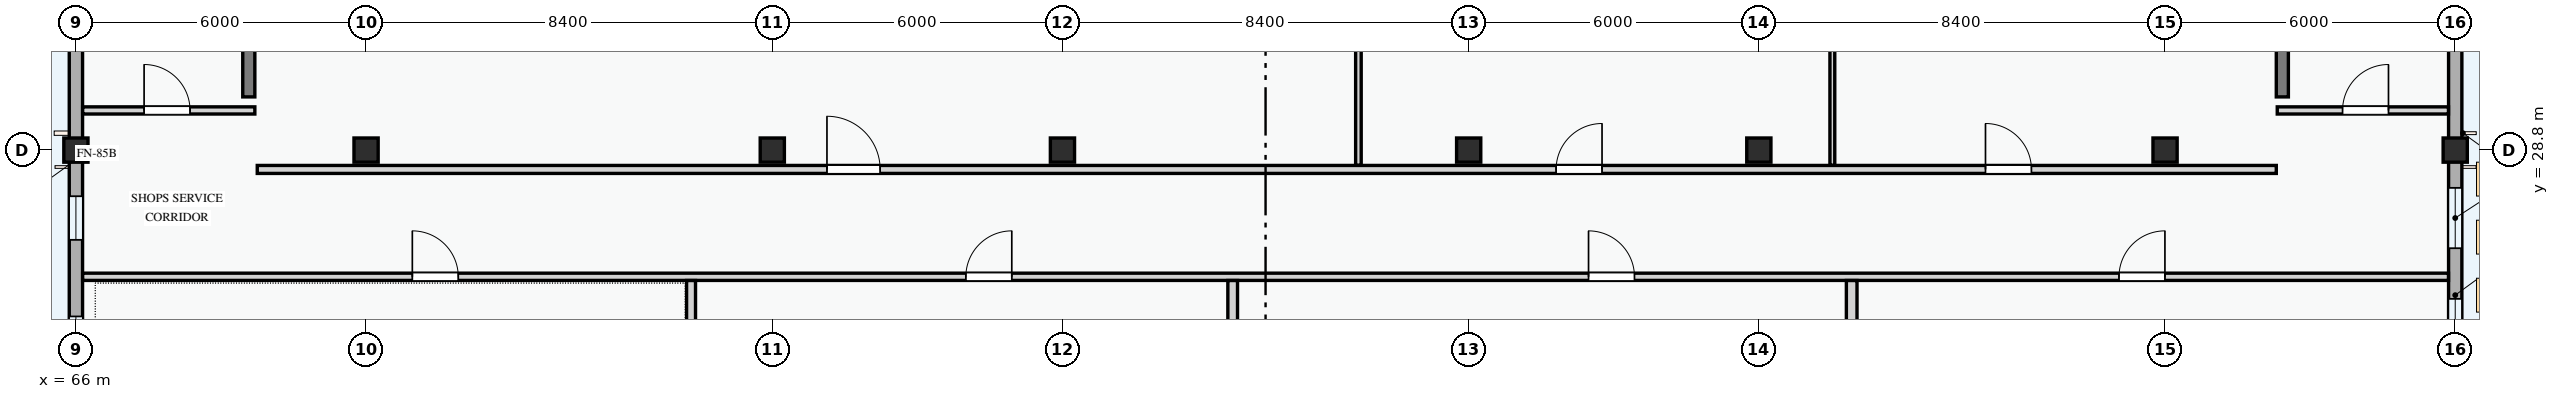
"""IFC4 building model, lengths in metres.
Left out: names, types, materials, properties, quantities, classifications, styles, units other than length and angle.
Written with IfcOpenShell. Run it as: python <this file> out.ifc"""

import sys

from ifc_helpers import new_model, si_unit, direction, frame, frame_2d, origin, origin_2d, place, context, subcontext, project, spatial, rectangle, circle, extrude, element, fill, save


model = new_model("IFC4")
c1 = context("Model", 3, precision=1e-05, world=origin(), true_north=direction((0.0, 1.0)))
c2 = subcontext(c1, "Body", "Model", "MODEL_VIEW")
j1 = project(units=[si_unit("LENGTHUNIT", "METRE"), si_unit("PLANEANGLEUNIT", "RADIAN")], contexts=[c1])
p1 = place(None, origin())
s1 = spatial("IfcSite", under=j1, at=p1, CompositionType="ELEMENT")
p2 = place(p1, origin())
s2 = spatial("IfcBuilding", under=s1, at=p2, CompositionType="ELEMENT")
p3 = place(p2, origin())
s3 = spatial("IfcBuildingStorey", under=s2, at=p3, CompositionType="ELEMENT", Elevation=0.0)
p4 = place(p3, frame((66.0, 28.8, 0.0), z_axis=(0.0, 0.0, 1.0), x_axis=(1.0, 0.0, 0.0)))
e1 = element("IfcColumn", 1, at=p4, inside=s3, PredefinedType="COLUMN", context=c2, shape_type="SweptSolid", body=[
    extrude(rectangle(XDim=0.5, YDim=0.5, at=origin_2d()), origin(), (0.0, 0.0, 1.0), 4.5),
])
for number, where, z_axis, x_axis in (
    (2, (72.0, 28.8, 0.0), (0.0, 0.0, 1.0), (1.0, 0.0, 0.0)),
    (3, (80.4, 28.8, 0.0), (0.0, 0.0, 1.0), (1.0, 0.0, 0.0)),
    (4, (86.4, 28.8, 0.0), (0.0, 0.0, 1.0), (1.0, 0.0, 0.0)),
    (5, (94.8, 28.8, 0.0), (0.0, 0.0, 1.0), (1.0, 0.0, 0.0)),
    (6, (100.8, 28.8, 0.0), (0.0, 0.0, 1.0), (1.0, 0.0, 0.0)),
    (7, (109.2, 28.8, 0.0), (0.0, 0.0, 1.0), (1.0, 0.0, 0.0)),
):
    element("IfcColumn", number, at=place(p3, frame(where, z_axis=z_axis, x_axis=x_axis)), inside=s3, PredefinedType="COLUMN", context=c2, shape_type="SweptSolid", body=[
        extrude(circle(Radius=0.25, at=origin_2d()), origin(), (0.0, 0.0, 1.0), 4.5),
    ])
p5 = place(p3, frame((115.2, 28.8, 0.0), z_axis=(0.0, 0.0, 1.0), x_axis=(1.0, 0.0, 0.0)))
e8 = element("IfcColumn", 8, at=p5, inside=s3, PredefinedType="COLUMN", context=c2, shape_type="SweptSolid", body=[
    extrude(rectangle(XDim=0.5, YDim=0.5, at=origin_2d()), origin(), (0.0, 0.0, 1.0), 4.5),
])
p6 = place(p3, frame((115.2, 22.8, 0.0), z_axis=(0.0, 0.0, 1.0), x_axis=(0.0, 1.0, 0.0)))
e9 = element("IfcWall", 9, at=p6, inside=s3, PredefinedType="STANDARD", context=c2, shape_type="SweptSolid", body=[
    extrude(rectangle(XDim=6.0, YDim=0.275, at=frame_2d((3.0, 0.0))), origin(), (0.0, 0.0, 1.0), 3.585),
])
p7 = place(p6, frame((0.645, 0.0, 0.8)))
e10 = element("IfcOpeningElement", 10, at=p7, cuts=e9, PredefinedType="OPENING", context=c2, shape_type="SweptSolid", body=[
    extrude(rectangle(XDim=2.28, YDim=1.46, at=frame_2d((1.14, 0.73))), frame((0.0, 0.147, 0.0), z_axis=(0.0, -1.0, 0.0), x_axis=(1.0, 0.0, 0.0)), (0.0, 0.0, 1.0), 0.295),
])
p8 = place(p6, frame((3.97, 0.0, 0.8)))
e11 = element("IfcOpeningElement", 11, at=p8, cuts=e9, PredefinedType="OPENING", context=c2, shape_type="SweptSolid", body=[
    extrude(rectangle(XDim=1.25, YDim=1.45, at=frame_2d((0.625, 0.725))), frame((0.0, 0.147, 0.0), z_axis=(0.0, -1.0, 0.0), x_axis=(1.0, 0.0, 0.0)), (0.0, 0.0, 1.0), 0.295),
])
p9 = place(p3, frame((115.2, 28.8, 0.0), z_axis=(0.0, 0.0, 1.0), x_axis=(0.0, 1.0, 0.0)))
e12 = element("IfcWall", 12, at=p9, inside=s3, PredefinedType="STANDARD", context=c2, shape_type="SweptSolid", body=[
    extrude(rectangle(XDim=8.4, YDim=0.275, at=frame_2d((4.2, 0.0))), origin(), (0.0, 0.0, 1.0), 3.485),
])
p10 = place(p9, frame((4.015, 0.0, 0.8)))
e13 = element("IfcOpeningElement", 13, at=p10, cuts=e12, PredefinedType="OPENING", context=c2, shape_type="SweptSolid", body=[
    extrude(rectangle(XDim=1.0, YDim=1.25, at=frame_2d((0.5, 0.625))), frame((0.0, 0.147, 0.0), z_axis=(0.0, -1.0, 0.0), x_axis=(1.0, 0.0, 0.0)), (0.0, 0.0, 1.0), 0.295),
])
p11 = place(p3, frame((66.0, 37.2, 0.0), z_axis=(0.0, 0.0, 1.0), x_axis=(0.0, -1.0, 0.0)))
e14 = element("IfcWall", 14, at=p11, inside=s3, PredefinedType="STANDARD", context=c2, shape_type="SweptSolid", body=[
    extrude(rectangle(XDim=8.4, YDim=0.275, at=frame_2d((4.2, 0.0))), origin(), (0.0, 0.0, 1.0), 3.485),
])
p12 = place(p11, frame((3.36, 0.0, 0.8)))
e15 = element("IfcOpeningElement", 15, at=p12, cuts=e14, PredefinedType="OPENING", context=c2, shape_type="SweptSolid", body=[
    extrude(rectangle(XDim=1.05, YDim=1.2, at=frame_2d((0.525, 0.6))), frame((0.0, 0.147, 0.0), z_axis=(0.0, -1.0, 0.0), x_axis=(1.0, 0.0, 0.0)), (0.0, 0.0, 1.0), 0.295),
])
p13 = place(p3, frame((66.0, 28.8, 0.0), z_axis=(0.0, 0.0, 1.0), x_axis=(0.0, -1.0, 0.0)))
e16 = element("IfcWall", 16, at=p13, inside=s3, PredefinedType="STANDARD", context=c2, shape_type="SweptSolid", body=[
    extrude(rectangle(XDim=6.0, YDim=0.275, at=frame_2d((3.0, 0.0))), origin(), (0.0, 0.0, 1.0), 3.585),
])
p14 = place(p13, frame((0.955, 0.0, 0.8)))
e17 = element("IfcOpeningElement", 17, at=p14, cuts=e16, PredefinedType="OPENING", context=c2, shape_type="SweptSolid", body=[
    extrude(rectangle(XDim=0.9, YDim=1.2, at=frame_2d((0.45, 0.6))), frame((0.0, 0.147, 0.0), z_axis=(0.0, -1.0, 0.0), x_axis=(1.0, 0.0, 0.0)), (0.0, 0.0, 1.0), 0.295),
])
p15 = place(p13, frame((3.44, 0.0, 0.8)))
e18 = element("IfcOpeningElement", 18, at=p15, cuts=e16, PredefinedType="OPENING", context=c2, shape_type="SweptSolid", body=[
    extrude(rectangle(XDim=1.55, YDim=1.4, at=frame_2d((0.775, 0.7))), frame((0.0, 0.147, 0.0), z_axis=(0.0, -1.0, 0.0), x_axis=(1.0, 0.0, 0.0)), (0.0, 0.0, 1.0), 0.295),
])
for number, where, z_axis, x_axis in (
    (19, (69.575, 29.9, 0.0), (0.0, 0.0, 1.0), (0.0, 1.0, 0.0)),
    (20, (111.625, 29.9, 0.0), (0.0, 0.0, 1.0), (0.0, 1.0, 0.0)),
):
    element("IfcWall", number, at=place(p3, frame(where, z_axis=z_axis, x_axis=x_axis)), inside=s3, PredefinedType="SHEAR", context=c2, shape_type="SweptSolid", body=[
        extrude(rectangle(XDim=6.7, YDim=0.25, at=frame_2d((3.35, 0.0))), origin(), (0.0, 0.0, 1.0), 4.2),
    ])
p16 = place(p3, frame((66.139, 26.18, 0.0), z_axis=(0.0, 0.0, 1.0), x_axis=(1.0, 0.0, 0.0)))
e21 = element("IfcWall", 21, at=p16, inside=s3, PredefinedType="PARTITIONING", context=c2, shape_type="SweptSolid", body=[
    extrude(rectangle(XDim=48.921, YDim=0.15, at=frame_2d((24.46, 0.0))), origin(), (0.0, 0.0, 1.0), 4.2),
])
p17 = place(p16, frame((6.817, 0.0, 0.0)))
e22 = element("IfcOpeningElement", 22, at=p17, cuts=e21, PredefinedType="OPENING", context=c2, shape_type="SweptSolid", body=[
    extrude(rectangle(XDim=0.95, YDim=2.1, at=frame_2d((0.475, 1.05))), frame((0.0, 0.085, 0.0), z_axis=(0.0, -1.0, 0.0), x_axis=(1.0, 0.0, 0.0)), (0.0, 0.0, 1.0), 0.17),
])
p18 = place(p16, frame((18.263, 0.0, 0.0)))
e23 = element("IfcOpeningElement", 23, at=p18, cuts=e21, PredefinedType="OPENING", context=c2, shape_type="SweptSolid", body=[
    extrude(rectangle(XDim=0.95, YDim=2.1, at=frame_2d((0.475, 1.05))), frame((0.0, 0.085, 0.0), z_axis=(0.0, -1.0, 0.0), x_axis=(1.0, 0.0, 0.0)), (0.0, 0.0, 1.0), 0.17),
])
p19 = place(p16, frame((31.139, 0.0, 0.0)))
e24 = element("IfcOpeningElement", 24, at=p19, cuts=e21, PredefinedType="OPENING", context=c2, shape_type="SweptSolid", body=[
    extrude(rectangle(XDim=0.95, YDim=2.1, at=frame_2d((0.475, 1.05))), frame((0.0, 0.085, 0.0), z_axis=(0.0, -1.0, 0.0), x_axis=(1.0, 0.0, 0.0)), (0.0, 0.0, 1.0), 0.17),
])
p20 = place(p16, frame((42.108, 0.0, 0.0)))
e25 = element("IfcOpeningElement", 25, at=p20, cuts=e21, PredefinedType="OPENING", context=c2, shape_type="SweptSolid", body=[
    extrude(rectangle(XDim=0.95, YDim=2.1, at=frame_2d((0.475, 1.05))), frame((0.0, 0.085, 0.0), z_axis=(0.0, -1.0, 0.0), x_axis=(1.0, 0.0, 0.0)), (0.0, 0.0, 1.0), 0.17),
])
p21 = place(p3, frame((92.52, 28.485, 0.0), z_axis=(0.0, 0.0, 1.0), x_axis=(0.0, 1.0, 0.0)))
e26 = element("IfcWall", 26, at=p21, inside=s3, PredefinedType="PARTITIONING", context=c2, shape_type="SweptSolid", body=[
    extrude(rectangle(XDim=8.561, YDim=0.115, at=frame_2d((4.28, 0.0))), origin(), (0.0, 0.0, 1.0), 4.2),
])
p22 = place(p3, frame((102.32, 28.485, 0.0), z_axis=(0.0, 0.0, 1.0), x_axis=(0.0, 1.0, 0.0)))
e27 = element("IfcWall", 27, at=p22, inside=s3, PredefinedType="PARTITIONING", context=c2, shape_type="SweptSolid", body=[
    extrude(rectangle(XDim=8.561, YDim=0.1, at=frame_2d((4.28, 0.0))), origin(), (0.0, 0.0, 1.0), 4.2),
])
p23 = place(p3, frame((66.139, 29.62, 0.0), z_axis=(0.0, 0.0, 1.0), x_axis=(1.0, 0.0, 0.0)))
e28 = element("IfcWall", 28, at=p23, inside=s3, PredefinedType="PARTITIONING", context=c2, shape_type="SweptSolid", body=[
    extrude(rectangle(XDim=3.561, YDim=0.148, at=frame_2d((1.78, 0.0))), origin(), (0.0, 0.0, 1.0), 4.2),
])
p24 = place(p23, frame((1.271, 0.0, 0.0)))
e29 = element("IfcOpeningElement", 29, at=p24, cuts=e28, PredefinedType="OPENING", context=c2, shape_type="SweptSolid", body=[
    extrude(rectangle(XDim=0.95, YDim=2.1, at=frame_2d((0.475, 1.05))), frame((0.0, 0.084, 0.0), z_axis=(0.0, -1.0, 0.0), x_axis=(1.0, 0.0, 0.0)), (0.0, 0.0, 1.0), 0.168),
])
p25 = place(p3, frame((111.52, 29.62, 0.0), z_axis=(0.0, 0.0, 1.0), x_axis=(1.0, 0.0, 0.0)))
e30 = element("IfcWall", 30, at=p25, inside=s3, PredefinedType="PARTITIONING", context=c2, shape_type="SweptSolid", body=[
    extrude(rectangle(XDim=3.541, YDim=0.148, at=frame_2d((1.77, 0.0))), origin(), (0.0, 0.0, 1.0), 4.2),
])
p26 = place(p25, frame((1.35, 0.0, 0.0)))
e31 = element("IfcOpeningElement", 31, at=p26, cuts=e30, PredefinedType="OPENING", context=c2, shape_type="SweptSolid", body=[
    extrude(rectangle(XDim=0.95, YDim=2.1, at=frame_2d((0.475, 1.05))), frame((0.0, 0.084, 0.0), z_axis=(0.0, -1.0, 0.0), x_axis=(1.0, 0.0, 0.0)), (0.0, 0.0, 1.0), 0.168),
])
p27 = place(p3, frame((69.75, 28.4, 0.0), z_axis=(0.0, 0.0, 1.0), x_axis=(1.0, 0.0, 0.0)))
e32 = element("IfcWall", 32, at=p27, inside=s3, PredefinedType="PARTITIONING", context=c2, shape_type="SweptSolid", body=[
    extrude(rectangle(XDim=41.75, YDim=0.165, at=frame_2d((20.875, 0.0))), origin(), (0.0, 0.0, 1.0), 3.485),
])
p28 = place(p27, frame((11.781, 0.0, 0.0)))
e33 = element("IfcOpeningElement", 33, at=p28, cuts=e32, PredefinedType="OPENING", context=c2, shape_type="SweptSolid", body=[
    extrude(rectangle(XDim=1.1, YDim=2.15, at=frame_2d((0.55, 1.075))), frame((0.0, 0.093, 0.0), z_axis=(0.0, -1.0, 0.0), x_axis=(1.0, 0.0, 0.0)), (0.0, 0.0, 1.0), 0.185),
])
p29 = place(p27, frame((26.858, 0.0, 0.0)))
e34 = element("IfcOpeningElement", 34, at=p29, cuts=e32, PredefinedType="OPENING", context=c2, shape_type="SweptSolid", body=[
    extrude(rectangle(XDim=0.95, YDim=2.1, at=frame_2d((0.475, 1.05))), frame((0.0, 0.093, 0.0), z_axis=(0.0, -1.0, 0.0), x_axis=(1.0, 0.0, 0.0)), (0.0, 0.0, 1.0), 0.185),
])
p30 = place(p27, frame((35.737, 0.0, 0.0)))
e35 = element("IfcOpeningElement", 35, at=p30, cuts=e32, PredefinedType="OPENING", context=c2, shape_type="SweptSolid", body=[
    extrude(rectangle(XDim=0.95, YDim=2.1, at=frame_2d((0.475, 1.05))), frame((0.0, 0.093, 0.0), z_axis=(0.0, -1.0, 0.0), x_axis=(1.0, 0.0, 0.0)), (0.0, 0.0, 1.0), 0.185),
])
p31 = place(p3, frame((78.72, 14.46, 0.0), z_axis=(0.0, 0.0, 1.0), x_axis=(0.0, 1.0, 0.0)))
e36 = element("IfcWall", 36, at=p31, inside=s3, PredefinedType="PARTITIONING", context=c2, shape_type="SweptSolid", body=[
    extrude(rectangle(XDim=11.643, YDim=0.185, at=frame_2d((5.822, 0.0))), origin(), (0.0, 0.0, 1.0), 4.2),
])
p32 = place(p3, frame((89.92, 14.46, 0.0), z_axis=(0.0, 0.0, 1.0), x_axis=(0.0, 1.0, 0.0)))
e37 = element("IfcWall", 37, at=p32, inside=s3, PredefinedType="PARTITIONING", context=c2, shape_type="SweptSolid", body=[
    extrude(rectangle(XDim=11.643, YDim=0.2, at=frame_2d((5.822, 0.0))), origin(), (0.0, 0.0, 1.0), 4.2),
])
p33 = place(p3, frame((102.72, 14.46, 0.0), z_axis=(0.0, 0.0, 1.0), x_axis=(0.0, 1.0, 0.0)))
e38 = element("IfcWall", 38, at=p33, inside=s3, PredefinedType="PARTITIONING", context=c2, shape_type="SweptSolid", body=[
    extrude(rectangle(XDim=11.643, YDim=0.22, at=frame_2d((5.822, 0.0))), origin(), (0.0, 0.0, 1.0), 4.2),
])
p34 = place(p7, origin())
e39 = element("IfcWindow", 39, at=p34, inside=s3, PartitioningType="DOUBLE_PANEL_VERTICAL", PredefinedType="WINDOW", context=c2, shape_type="SweptSolid", body=[
    extrude(rectangle(XDim=2.28, YDim=1.46, at=frame_2d((1.14, 0.73))), frame((0.0, 0.03, 0.0), z_axis=(0.0, -1.0, 0.0), x_axis=(1.0, 0.0, 0.0)), (0.0, 0.0, 1.0), 0.06),
])
fill(e10, e39)
p35 = place(p8, origin())
e40 = element("IfcWindow", 40, at=p35, inside=s3, PartitioningType="SINGLE_PANEL", PredefinedType="WINDOW", context=c2, shape_type="SweptSolid", body=[
    extrude(rectangle(XDim=1.25, YDim=1.45, at=frame_2d((0.625, 0.725))), frame((0.0, 0.03, 0.0), z_axis=(0.0, -1.0, 0.0), x_axis=(1.0, 0.0, 0.0)), (0.0, 0.0, 1.0), 0.06),
])
fill(e11, e40)
p36 = place(p14, origin())
e41 = element("IfcWindow", 41, at=p36, inside=s3, PartitioningType="SINGLE_PANEL", PredefinedType="WINDOW", context=c2, shape_type="SweptSolid", body=[
    extrude(rectangle(XDim=0.9, YDim=1.2, at=frame_2d((0.45, 0.6))), frame((0.0, 0.03, 0.0), z_axis=(0.0, -1.0, 0.0), x_axis=(1.0, 0.0, 0.0)), (0.0, 0.0, 1.0), 0.06),
])
fill(e17, e41)
p37 = place(p15, origin())
e42 = element("IfcWindow", 42, at=p37, inside=s3, PartitioningType="SINGLE_PANEL", PredefinedType="WINDOW", context=c2, shape_type="SweptSolid", body=[
    extrude(rectangle(XDim=1.55, YDim=1.4, at=frame_2d((0.775, 0.7))), frame((0.0, 0.03, 0.0), z_axis=(0.0, -1.0, 0.0), x_axis=(1.0, 0.0, 0.0)), (0.0, 0.0, 1.0), 0.06),
])
fill(e18, e42)
p38 = place(p17, origin())
e43 = element("IfcDoor", 43, at=p38, inside=s3, OperationType="SINGLE_SWING_LEFT", PredefinedType="DOOR", context=c2, shape_type="SweptSolid", body=[
    extrude(rectangle(XDim=0.95, YDim=2.1, at=frame_2d((0.475, 1.05))), frame((0.0, 0.025, 0.0), z_axis=(0.0, -1.0, 0.0), x_axis=(1.0, 0.0, 0.0)), (0.0, 0.0, 1.0), 0.05),
])
fill(e22, e43)
p39 = place(p18, origin())
e44 = element("IfcDoor", 44, at=p39, inside=s3, OperationType="SINGLE_SWING_RIGHT", PredefinedType="DOOR", context=c2, shape_type="SweptSolid", body=[
    extrude(rectangle(XDim=0.95, YDim=2.1, at=frame_2d((0.475, 1.05))), frame((0.0, 0.025, 0.0), z_axis=(0.0, -1.0, 0.0), x_axis=(1.0, 0.0, 0.0)), (0.0, 0.0, 1.0), 0.05),
])
fill(e23, e44)
p40 = place(p19, origin())
e45 = element("IfcDoor", 45, at=p40, inside=s3, OperationType="SINGLE_SWING_LEFT", PredefinedType="DOOR", context=c2, shape_type="SweptSolid", body=[
    extrude(rectangle(XDim=0.95, YDim=2.1, at=frame_2d((0.475, 1.05))), frame((0.0, 0.025, 0.0), z_axis=(0.0, -1.0, 0.0), x_axis=(1.0, 0.0, 0.0)), (0.0, 0.0, 1.0), 0.05),
])
fill(e24, e45)
p41 = place(p20, origin())
e46 = element("IfcDoor", 46, at=p41, inside=s3, OperationType="SINGLE_SWING_RIGHT", PredefinedType="DOOR", context=c2, shape_type="SweptSolid", body=[
    extrude(rectangle(XDim=0.95, YDim=2.1, at=frame_2d((0.475, 1.05))), frame((0.0, 0.025, 0.0), z_axis=(0.0, -1.0, 0.0), x_axis=(1.0, 0.0, 0.0)), (0.0, 0.0, 1.0), 0.05),
])
fill(e25, e46)
p42 = place(p24, origin())
e47 = element("IfcDoor", 47, at=p42, inside=s3, OperationType="SINGLE_SWING_LEFT", PredefinedType="DOOR", context=c2, shape_type="SweptSolid", body=[
    extrude(rectangle(XDim=0.95, YDim=2.1, at=frame_2d((0.475, 1.05))), frame((0.0, 0.025, 0.0), z_axis=(0.0, -1.0, 0.0), x_axis=(1.0, 0.0, 0.0)), (0.0, 0.0, 1.0), 0.05),
])
fill(e29, e47)
p43 = place(p26, origin())
e48 = element("IfcDoor", 48, at=p43, inside=s3, OperationType="SINGLE_SWING_RIGHT", PredefinedType="DOOR", context=c2, shape_type="SweptSolid", body=[
    extrude(rectangle(XDim=0.95, YDim=2.1, at=frame_2d((0.475, 1.05))), frame((0.0, 0.025, 0.0), z_axis=(0.0, -1.0, 0.0), x_axis=(1.0, 0.0, 0.0)), (0.0, 0.0, 1.0), 0.05),
])
fill(e31, e48)
p44 = place(p28, origin())
e49 = element("IfcDoor", 49, at=p44, inside=s3, OperationType="SINGLE_SWING_LEFT", PredefinedType="DOOR", context=c2, shape_type="SweptSolid", body=[
    extrude(rectangle(XDim=1.1, YDim=2.15, at=frame_2d((0.55, 1.075))), frame((0.0, 0.025, 0.0), z_axis=(0.0, -1.0, 0.0), x_axis=(1.0, 0.0, 0.0)), (0.0, 0.0, 1.0), 0.05),
])
fill(e33, e49)
p45 = place(p29, origin())
e50 = element("IfcDoor", 50, at=p45, inside=s3, OperationType="SINGLE_SWING_RIGHT", PredefinedType="DOOR", context=c2, shape_type="SweptSolid", body=[
    extrude(rectangle(XDim=0.95, YDim=2.1, at=frame_2d((0.475, 1.05))), frame((0.0, 0.025, 0.0), z_axis=(0.0, -1.0, 0.0), x_axis=(1.0, 0.0, 0.0)), (0.0, 0.0, 1.0), 0.05),
])
fill(e34, e50)
p46 = place(p30, origin())
e51 = element("IfcDoor", 51, at=p46, inside=s3, OperationType="SINGLE_SWING_LEFT", PredefinedType="DOOR", context=c2, shape_type="SweptSolid", body=[
    extrude(rectangle(XDim=0.95, YDim=2.1, at=frame_2d((0.475, 1.05))), frame((0.0, 0.025, 0.0), z_axis=(0.0, -1.0, 0.0), x_axis=(1.0, 0.0, 0.0)), (0.0, 0.0, 1.0), 0.05),
])
fill(e35, e51)
save(model, sys.argv[1])
